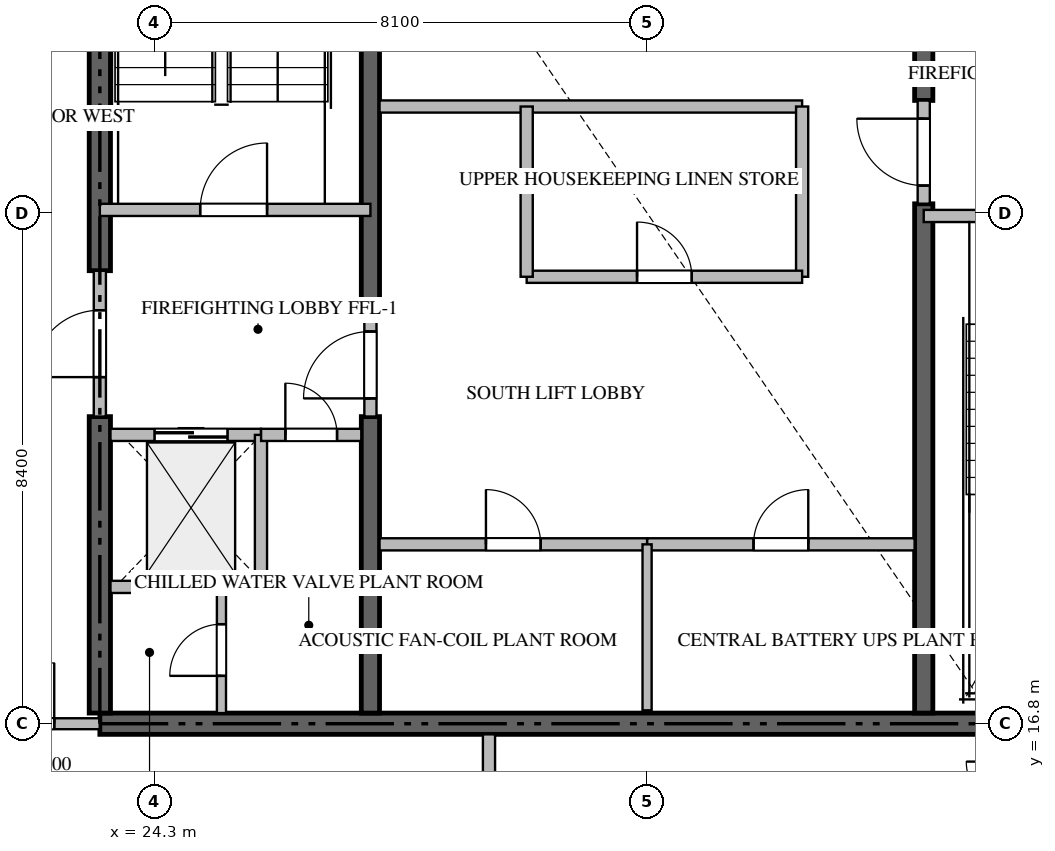
"""IFC4 building model, lengths in metres.
Left out: names, types, materials, properties, quantities, classifications, styles, units other than length and angle.
Written with IfcOpenShell. Run it as: python <this file> out.ifc"""

import sys

from ifc_helpers import new_model, si_unit, direction, frame, frame_2d, origin, place, context, subcontext, project, spatial, rectangle, extrude, source, transform, mapped, element, fill, save


model = new_model("IFC4")
c1 = context("Model", 3, precision=1e-05, world=origin(), true_north=direction((0.0, 1.0)))
c2 = subcontext(c1, "Body", "Model", "MODEL_VIEW")
j1 = project(units=[si_unit("LENGTHUNIT", "METRE"), si_unit("PLANEANGLEUNIT", "RADIAN")], contexts=[c1])
p1 = place(None, origin())
s1 = spatial("IfcSite", under=j1, at=p1, CompositionType="ELEMENT")
p2 = place(p1, origin())
s2 = spatial("IfcBuilding", under=s1, at=p2, CompositionType="ELEMENT")
p3 = place(p2, frame((0.0, 0.0, 297.5)))
s3 = spatial("IfcBuildingStorey", under=s2, at=p3, CompositionType="ELEMENT", Elevation=297.5)
p4 = place(p3, frame((23.4, 16.8, -0.26), z_axis=(0.0, 0.0, 1.0), x_axis=(1.0, 0.0, 0.0)))
e1 = element("IfcWall", 1, at=p4, inside=s3, PredefinedType="SHEAR", context=c2, shape_type="SweptSolid", body=[
    extrude(rectangle(XDim=18.0, YDim=0.35, at=frame_2d((9.0, 0.0))), origin(), (0.0, 0.0, 1.0), 4.048),
])
p5 = place(p3, frame((23.4, 16.975, -0.26), z_axis=(0.0, 0.0, 1.0), x_axis=(0.0, 1.0, 0.0)))
e2 = element("IfcWall", 2, at=p5, inside=s3, PredefinedType="SHEAR", context=c2, shape_type="SweptSolid", body=[
    extrude(rectangle(XDim=4.875, YDim=0.35, at=frame_2d((2.438, 0.0))), origin(), (0.0, 0.0, 1.0), 4.048),
])
p6 = place(p3, frame((23.4, 24.25, -0.26), z_axis=(0.0, 0.0, 1.0), x_axis=(0.0, 1.0, 0.0)))
e3 = element("IfcWall", 3, at=p6, inside=s3, PredefinedType="SHEAR", context=c2, shape_type="SweptSolid", body=[
    extrude(rectangle(XDim=9.175, YDim=0.35, at=frame_2d((4.587, 0.0))), origin(), (0.0, 0.0, 1.0), 4.048),
])
p7 = place(p3, frame((27.85, 16.975, -0.26), z_axis=(0.0, 0.0, 1.0), x_axis=(0.0, 1.0, 0.0)))
e4 = element("IfcWall", 4, at=p7, inside=s3, PredefinedType="SHEAR", context=c2, shape_type="SweptSolid", body=[
    extrude(rectangle(XDim=4.875, YDim=0.3, at=frame_2d((2.438, 0.0))), origin(), (0.0, 0.0, 1.0), 4.048),
])
p8 = place(p3, frame((27.85, 23.55, -0.26), z_axis=(0.0, 0.0, 1.0), x_axis=(0.0, 1.0, 0.0)))
e5 = element("IfcWall", 5, at=p8, inside=s3, PredefinedType="SHEAR", context=c2, shape_type="SweptSolid", body=[
    extrude(rectangle(XDim=9.875, YDim=0.3, at=frame_2d((4.938, 0.0))), origin(), (0.0, 0.0, 1.0), 4.048),
])
p9 = place(p3, frame((36.95, 16.975, -0.26), z_axis=(0.0, 0.0, 1.0), x_axis=(0.0, 1.0, 0.0)))
e6 = element("IfcWall", 6, at=p9, inside=s3, PredefinedType="SHEAR", context=c2, shape_type="SweptSolid", body=[
    extrude(rectangle(XDim=8.375, YDim=0.3, at=frame_2d((4.188, 0.0))), origin(), (0.0, 0.0, 1.0), 4.048),
])
p10 = place(p3, frame((36.95, 27.05, -0.26), z_axis=(0.0, 0.0, 1.0), x_axis=(0.0, 1.0, 0.0)))
e7 = element("IfcWall", 7, at=p10, inside=s3, PredefinedType="SHEAR", context=c2, shape_type="SweptSolid", body=[
    extrude(rectangle(XDim=6.375, YDim=0.3, at=frame_2d((3.188, 0.0))), origin(), (0.0, 0.0, 1.0), 4.048),
])
p11 = place(p3, frame((23.4, 25.25, 0.0), z_axis=(0.0, 0.0, 1.0), x_axis=(1.0, 0.0, 0.0)))
e8 = element("IfcWall", 8, at=p11, inside=s3, PredefinedType="STANDARD", context=c2, shape_type="SweptSolid", body=[
    extrude(rectangle(XDim=4.45, YDim=0.2, at=frame_2d((2.225, 0.0))), origin(), (0.0, 0.0, 1.0), 3.79),
])
p12 = place(p11, frame((1.65, 0.0, 0.0)))
e9 = element("IfcOpeningElement", 9, at=p12, cuts=e8, PredefinedType="OPENING", context=c2, shape_type="SweptSolid", body=[
    extrude(rectangle(XDim=1.1, YDim=2.15, at=frame_2d((0.55, 1.075))), frame((0.0, 0.11, 0.0), z_axis=(0.0, -1.0, 0.0), x_axis=(1.0, 0.0, 0.0)), (0.0, 0.0, 1.0), 0.22),
])
p13 = place(p3, frame((36.95, 25.15, 0.0), z_axis=(0.0, 0.0, 1.0), x_axis=(1.0, 0.0, 0.0)))
e10 = element("IfcWall", 10, at=p13, inside=s3, PredefinedType="STANDARD", context=c2, shape_type="SweptSolid", body=[
    extrude(rectangle(XDim=4.45, YDim=0.2, at=frame_2d((2.225, 0.0))), origin(), (0.0, 0.0, 1.0), 3.79),
])
p14 = place(p13, frame((1.65, 0.0, 0.0)))
e11 = element("IfcOpeningElement", 11, at=p14, cuts=e10, PredefinedType="OPENING", context=c2, shape_type="SweptSolid", body=[
    extrude(rectangle(XDim=1.1, YDim=2.15, at=frame_2d((0.55, 1.075))), frame((0.0, 0.11, 0.0), z_axis=(0.0, -1.0, 0.0), x_axis=(1.0, 0.0, 0.0)), (0.0, 0.0, 1.0), 0.22),
])
p15 = place(p3, frame((23.575, 21.55, 0.0), z_axis=(0.0, 0.0, 1.0), x_axis=(1.0, 0.0, 0.0)))
e12 = element("IfcWall", 12, at=p15, inside=s3, PredefinedType="STANDARD", context=c2, shape_type="SweptSolid", body=[
    extrude(rectangle(XDim=2.475, YDim=0.2, at=frame_2d((1.238, 0.0))), origin(), (0.0, 0.0, 1.0), 3.79),
])
p16 = place(p15, frame((0.725, 0.0, 0.0)))
e13 = element("IfcOpeningElement", 13, at=p16, cuts=e12, PredefinedType="OPENING", context=c2, shape_type="SweptSolid", body=[
    extrude(rectangle(XDim=1.2, YDim=2.2, at=frame_2d((0.6, 1.1))), frame((0.0, 0.11, 0.0), z_axis=(0.0, -1.0, 0.0), x_axis=(1.0, 0.0, 0.0)), (0.0, 0.0, 1.0), 0.22),
])
p17 = place(p3, frame((26.05, 19.05, 0.0), z_axis=(0.0, 0.0, 1.0), x_axis=(0.0, 1.0, 0.0)))
e14 = element("IfcWall", 14, at=p17, inside=s3, PredefinedType="STANDARD", context=c2, shape_type="SweptSolid", body=[
    extrude(rectangle(XDim=2.5, YDim=0.2, at=frame_2d((1.25, 0.0))), origin(), (0.0, 0.0, 1.0), 3.79),
])
p18 = place(p3, frame((23.575, 19.05, 0.0), z_axis=(0.0, 0.0, 1.0), x_axis=(1.0, 0.0, 0.0)))
e15 = element("IfcWall", 15, at=p18, inside=s3, PredefinedType="STANDARD", context=c2, shape_type="SweptSolid", body=[
    extrude(rectangle(XDim=2.475, YDim=0.2, at=frame_2d((1.238, 0.0))), origin(), (0.0, 0.0, 1.0), 3.79),
])
p19 = place(p3, frame((26.052, 21.55, 0.0), z_axis=(0.0, 0.0, 1.0), x_axis=(1.0, 0.0, 0.0)))
e16 = element("IfcWall", 16, at=p19, inside=s3, PredefinedType="STANDARD", context=c2, shape_type="SweptSolid", body=[
    extrude(rectangle(XDim=1.648, YDim=0.2, at=frame_2d((0.824, 0.0))), origin(), (0.0, 0.0, 1.0), 3.79),
])
p20 = place(p19, frame((0.399, 0.0, 0.0)))
e17 = element("IfcOpeningElement", 17, at=p20, cuts=e16, PredefinedType="OPENING", context=c2, shape_type="SweptSolid", body=[
    extrude(rectangle(XDim=0.85, YDim=2.1, at=frame_2d((0.425, 1.05))), frame((0.0, 0.11, 0.0), z_axis=(0.0, -1.0, 0.0), x_axis=(1.0, 0.0, 0.0)), (0.0, 0.0, 1.0), 0.22),
])
p21 = place(p3, frame((23.4, 21.852, 0.0), z_axis=(0.0, 0.0, 1.0), x_axis=(0.0, 1.0, 0.0)))
e18 = element("IfcWall", 18, at=p21, inside=s3, PredefinedType="STANDARD", context=c2, shape_type="SweptSolid", body=[
    extrude(rectangle(XDim=2.396, YDim=0.2, at=frame_2d((1.198, 0.0))), origin(), (0.0, 0.0, 1.0), 3.79),
])
p22 = place(p21, frame((0.648, 0.0, 0.0)))
e19 = element("IfcOpeningElement", 19, at=p22, cuts=e18, PredefinedType="OPENING", context=c2, shape_type="SweptSolid", body=[
    extrude(rectangle(XDim=1.1, YDim=2.15, at=frame_2d((0.55, 1.075))), frame((0.0, 0.11, 0.0), z_axis=(0.0, -1.0, 0.0), x_axis=(1.0, 0.0, 0.0)), (0.0, 0.0, 1.0), 0.22),
])
p23 = place(p3, frame((27.85, 21.852, 0.0), z_axis=(0.0, 0.0, 1.0), x_axis=(0.0, 1.0, 0.0)))
e20 = element("IfcWall", 20, at=p23, inside=s3, PredefinedType="STANDARD", context=c2, shape_type="SweptSolid", body=[
    extrude(rectangle(XDim=1.696, YDim=0.2, at=frame_2d((0.848, 0.0))), origin(), (0.0, 0.0, 1.0), 3.79),
])
p24 = place(p23, frame((0.298, 0.0, 0.0)))
e21 = element("IfcOpeningElement", 21, at=p24, cuts=e20, PredefinedType="OPENING", context=c2, shape_type="SweptSolid", body=[
    extrude(rectangle(XDim=1.1, YDim=2.15, at=frame_2d((0.55, 1.075))), frame((0.0, 0.11, 0.0), z_axis=(0.0, -1.0, 0.0), x_axis=(1.0, 0.0, 0.0)), (0.0, 0.0, 1.0), 0.22),
])
p25 = place(p3, frame((36.95, 25.352, 0.0), z_axis=(0.0, 0.0, 1.0), x_axis=(0.0, 1.0, 0.0)))
e22 = element("IfcWall", 22, at=p25, inside=s3, PredefinedType="STANDARD", context=c2, shape_type="SweptSolid", body=[
    extrude(rectangle(XDim=1.696, YDim=0.2, at=frame_2d((0.848, 0.0))), origin(), (0.0, 0.0, 1.0), 3.79),
])
p26 = place(p25, frame((0.298, 0.0, 0.0)))
e23 = element("IfcOpeningElement", 23, at=p26, cuts=e22, PredefinedType="OPENING", context=c2, shape_type="SweptSolid", body=[
    extrude(rectangle(XDim=1.1, YDim=2.15, at=frame_2d((0.55, 1.075))), frame((0.0, 0.11, 0.0), z_axis=(0.0, -1.0, 0.0), x_axis=(1.0, 0.0, 0.0)), (0.0, 0.0, 1.0), 0.22),
])
p27 = place(p3, frame((25.4, 16.975, 0.0), z_axis=(0.0, 0.0, 1.0), x_axis=(0.0, 1.0, 0.0)))
e24 = element("IfcWall", 24, at=p27, inside=s3, PredefinedType="PARTITIONING", context=c2, shape_type="SweptSolid", body=[
    extrude(rectangle(XDim=2.075, YDim=0.15, at=frame_2d((1.038, 0.0))), origin(), (0.0, 0.0, 1.0), 3.79),
])
p28 = place(p27, frame((0.612, 0.0, 0.0)))
e25 = element("IfcOpeningElement", 25, at=p28, cuts=e24, PredefinedType="OPENING", context=c2, shape_type="SweptSolid", body=[
    extrude(rectangle(XDim=0.85, YDim=2.1, at=frame_2d((0.425, 1.05))), frame((0.0, 0.085, 0.0), z_axis=(0.0, -1.0, 0.0), x_axis=(1.0, 0.0, 0.0)), (0.0, 0.0, 1.0), 0.17),
])
p29 = place(p3, frame((28.0, 19.75, 0.0), z_axis=(0.0, 0.0, 1.0), x_axis=(1.0, 0.0, 0.0)))
e26 = element("IfcWall", 26, at=p29, inside=s3, PredefinedType="STANDARD", context=c2, shape_type="SweptSolid", body=[
    extrude(rectangle(XDim=4.4, YDim=0.2, at=frame_2d((2.2, 0.0))), origin(), (0.0, 0.0, 1.0), 3.79),
])
p30 = place(p29, frame((1.75, 0.0, 0.0)))
e27 = element("IfcOpeningElement", 27, at=p30, cuts=e26, PredefinedType="OPENING", context=c2, shape_type="SweptSolid", body=[
    extrude(rectangle(XDim=0.9, YDim=2.1, at=frame_2d((0.45, 1.05))), frame((0.0, 0.11, 0.0), z_axis=(0.0, -1.0, 0.0), x_axis=(1.0, 0.0, 0.0)), (0.0, 0.0, 1.0), 0.22),
])
p31 = place(p3, frame((32.402, 19.75, 0.0), z_axis=(0.0, 0.0, 1.0), x_axis=(1.0, 0.0, 0.0)))
e28 = element("IfcWall", 28, at=p31, inside=s3, PredefinedType="STANDARD", context=c2, shape_type="SweptSolid", body=[
    extrude(rectangle(XDim=4.398, YDim=0.2, at=frame_2d((2.199, 0.0))), origin(), (0.0, 0.0, 1.0), 3.79),
])
p32 = place(p31, frame((1.749, 0.0, 0.0)))
e29 = element("IfcOpeningElement", 29, at=p32, cuts=e28, PredefinedType="OPENING", context=c2, shape_type="SweptSolid", body=[
    extrude(rectangle(XDim=0.9, YDim=2.1, at=frame_2d((0.45, 1.05))), frame((0.0, 0.11, 0.0), z_axis=(0.0, -1.0, 0.0), x_axis=(1.0, 0.0, 0.0)), (0.0, 0.0, 1.0), 0.22),
])
p33 = place(p3, frame((32.4, 17.02, 0.0), z_axis=(0.0, 0.0, 1.0), x_axis=(0.0, 1.0, 0.0)))
e30 = element("IfcWall", 30, at=p33, inside=s3, PredefinedType="PARTITIONING", context=c2, shape_type="SweptSolid", body=[
    extrude(rectangle(XDim=2.73, YDim=0.15, at=frame_2d((1.365, 0.0))), origin(), (0.0, 0.0, 1.0), 3.79),
])
p34 = place(p3, frame((28.0, 26.95, 0.0), z_axis=(0.0, 0.0, 1.0), x_axis=(1.0, 0.0, 0.0)))
e31 = element("IfcWall", 31, at=p34, inside=s3, PredefinedType="STANDARD", context=c2, shape_type="SweptSolid", body=[
    extrude(rectangle(XDim=6.95, YDim=0.2, at=frame_2d((3.475, 0.0))), origin(), (0.0, 0.0, 1.0), 3.79),
])
p35 = place(p3, frame((34.95, 24.15, 0.0), z_axis=(0.0, 0.0, 1.0), x_axis=(0.0, 1.0, 0.0)))
e32 = element("IfcWall", 32, at=p35, inside=s3, PredefinedType="STANDARD", context=c2, shape_type="SweptSolid", body=[
    extrude(rectangle(XDim=2.8, YDim=0.2, at=frame_2d((1.4, 0.0))), origin(), (0.0, 0.0, 1.0), 3.79),
])
p36 = place(p3, frame((30.42, 24.15, 0.0), z_axis=(0.0, 0.0, 1.0), x_axis=(1.0, 0.0, 0.0)))
e33 = element("IfcWall", 33, at=p36, inside=s3, PredefinedType="STANDARD", context=c2, shape_type="SweptSolid", body=[
    extrude(rectangle(XDim=4.53, YDim=0.2, at=frame_2d((2.265, 0.0))), origin(), (0.0, 0.0, 1.0), 3.79),
])
p37 = place(p36, frame((1.815, 0.0, 0.0)))
e34 = element("IfcOpeningElement", 34, at=p37, cuts=e33, PredefinedType="OPENING", context=c2, shape_type="SweptSolid", body=[
    extrude(rectangle(XDim=0.9, YDim=2.1, at=frame_2d((0.45, 1.05))), frame((0.0, 0.11, 0.0), z_axis=(0.0, -1.0, 0.0), x_axis=(1.0, 0.0, 0.0)), (0.0, 0.0, 1.0), 0.22),
])
p38 = place(p3, frame((30.42, 24.15, 0.0), z_axis=(0.0, 0.0, 1.0), x_axis=(0.0, 1.0, 0.0)))
e35 = element("IfcWall", 35, at=p38, inside=s3, PredefinedType="STANDARD", context=c2, shape_type="SweptSolid", body=[
    extrude(rectangle(XDim=2.8, YDim=0.2, at=frame_2d((1.4, 0.0))), origin(), (0.0, 0.0, 1.0), 3.79),
])
p39 = place(p3, frame((29.8, 2.482, 0.0), z_axis=(0.0, 0.0, 1.0), x_axis=(0.0, 1.0, 0.0)))
e36 = element("IfcWall", 36, at=p39, inside=s3, PredefinedType="PARTITIONING", context=c2, shape_type="SweptSolid", body=[
    extrude(rectangle(XDim=14.143, YDim=0.2, at=frame_2d((7.072, 0.0))), origin(), (0.0, 0.0, 1.0), 3.79),
])
p40 = place(p3, frame((20.902, 16.8, 0.0), z_axis=(0.0, 0.0, 1.0), x_axis=(1.0, 0.0, 0.0)))
e37 = element("IfcWall", 37, at=p40, inside=s3, PredefinedType="PARTITIONING", context=c2, shape_type="SweptSolid", body=[
    extrude(rectangle(XDim=2.496, YDim=0.18, at=frame_2d((1.248, 0.0))), origin(), (0.0, 0.0, 1.0), 3.79),
])
p41 = place(p40, frame((0.748, 0.0, 0.0)))
e38 = element("IfcOpeningElement", 38, at=p41, cuts=e37, PredefinedType="OPENING", context=c2, shape_type="SweptSolid", body=[
    extrude(rectangle(XDim=1.0, YDim=2.15, at=frame_2d((0.5, 1.075))), frame((0.0, 0.1, 0.0), z_axis=(0.0, -1.0, 0.0), x_axis=(1.0, 0.0, 0.0)), (0.0, 0.0, 1.0), 0.2),
])
m1 = source(origin(), c2, "Body", "SweptSolid", [
    extrude(rectangle(XDim=1.1, YDim=2.15, at=frame_2d((0.55, 1.075))), frame((0.0, 0.025, 0.0), z_axis=(0.0, -1.0, 0.0), x_axis=(1.0, 0.0, 0.0)), (0.0, 0.0, 1.0), 0.05),
])
p42 = place(p12, origin())
e39 = element("IfcDoor", 39, at=p42, inside=s3, OperationType="SINGLE_SWING_RIGHT", PredefinedType="DOOR", context=c2, shape_type="MappedRepresentation", body=[
    mapped(m1, transform((0.0, 0.0, 0.0), scale=1.0)),
])
fill(e9, e39)
m2 = source(origin(), c2, "Body", "SweptSolid", [
    extrude(rectangle(XDim=1.2, YDim=2.2, at=frame_2d((0.6, 1.1))), frame((0.0, 0.025, 0.0), z_axis=(0.0, -1.0, 0.0), x_axis=(1.0, 0.0, 0.0)), (0.0, 0.0, 1.0), 0.05),
])
p43 = place(p16, origin())
e40 = element("IfcDoor", 40, at=p43, inside=s3, OperationType="DOUBLE_DOOR_SLIDING", PredefinedType="DOOR", context=c2, shape_type="MappedRepresentation", body=[
    mapped(m2, transform((0.0, 0.0, 0.0), scale=1.0)),
])
fill(e13, e40)
m3 = source(origin(), c2, "Body", "SweptSolid", [
    extrude(rectangle(XDim=0.85, YDim=2.1, at=frame_2d((0.425, 1.05))), frame((0.0, 0.025, 0.0), z_axis=(0.0, -1.0, 0.0), x_axis=(1.0, 0.0, 0.0)), (0.0, 0.0, 1.0), 0.05),
])
p44 = place(p20, origin())
e41 = element("IfcDoor", 41, at=p44, inside=s3, OperationType="SINGLE_SWING_LEFT", PredefinedType="DOOR", context=c2, shape_type="MappedRepresentation", body=[
    mapped(m3, transform((0.0, 0.0, 0.0), scale=1.0)),
])
fill(e17, e41)
p45 = place(p22, origin())
e42 = element("IfcDoor", 42, at=p45, inside=s3, OperationType="SINGLE_SWING_LEFT", PredefinedType="DOOR", context=c2, shape_type="MappedRepresentation", body=[
    mapped(m1, transform((0.0, 0.0, 0.0), scale=1.0)),
])
fill(e19, e42)
p46 = place(p24, origin())
e43 = element("IfcDoor", 43, at=p46, inside=s3, OperationType="SINGLE_SWING_LEFT", PredefinedType="DOOR", context=c2, shape_type="MappedRepresentation", body=[
    mapped(m1, transform((0.0, 0.0, 0.0), scale=1.0)),
])
fill(e21, e43)
p47 = place(p26, origin())
e44 = element("IfcDoor", 44, at=p47, inside=s3, OperationType="SINGLE_SWING_RIGHT", PredefinedType="DOOR", context=c2, shape_type="MappedRepresentation", body=[
    mapped(m1, transform((0.0, 0.0, 0.0), scale=1.0)),
])
fill(e23, e44)
p48 = place(p28, origin())
e45 = element("IfcDoor", 45, at=p48, inside=s3, OperationType="SINGLE_SWING_LEFT", PredefinedType="DOOR", context=c2, shape_type="MappedRepresentation", body=[
    mapped(m3, transform((0.0, 0.0, 0.0), scale=1.0)),
])
fill(e25, e45)
m4 = source(origin(), c2, "Body", "SweptSolid", [
    extrude(rectangle(XDim=0.9, YDim=2.1, at=frame_2d((0.45, 1.05))), frame((0.0, 0.025, 0.0), z_axis=(0.0, -1.0, 0.0), x_axis=(1.0, 0.0, 0.0)), (0.0, 0.0, 1.0), 0.05),
])
p49 = place(p30, origin())
e46 = element("IfcDoor", 46, at=p49, inside=s3, OperationType="SINGLE_SWING_LEFT", PredefinedType="DOOR", context=c2, shape_type="MappedRepresentation", body=[
    mapped(m4, transform((0.0, 0.0, 0.0), scale=1.0)),
])
fill(e27, e46)
p50 = place(p32, origin())
e47 = element("IfcDoor", 47, at=p50, inside=s3, OperationType="SINGLE_SWING_RIGHT", PredefinedType="DOOR", context=c2, shape_type="MappedRepresentation", body=[
    mapped(m4, transform((0.0, 0.0, 0.0), scale=1.0)),
])
fill(e29, e47)
p51 = place(p37, origin())
e48 = element("IfcDoor", 48, at=p51, inside=s3, OperationType="SINGLE_SWING_LEFT", PredefinedType="DOOR", context=c2, shape_type="MappedRepresentation", body=[
    mapped(m4, transform((0.0, 0.0, 0.0), scale=1.0)),
])
fill(e34, e48)
m5 = source(origin(), c2, "Body", "SweptSolid", [
    extrude(rectangle(XDim=1.0, YDim=2.15, at=frame_2d((0.5, 1.075))), frame((0.0, 0.025, 0.0), z_axis=(0.0, -1.0, 0.0), x_axis=(1.0, 0.0, 0.0)), (0.0, 0.0, 1.0), 0.05),
])
p52 = place(p41, origin())
e49 = element("IfcDoor", 49, at=p52, inside=s3, OperationType="SINGLE_SWING_RIGHT", PredefinedType="DOOR", context=c2, shape_type="MappedRepresentation", body=[
    mapped(m5, transform((0.0, 0.0, 0.0), scale=1.0)),
])
fill(e38, e49)
save(model, sys.argv[1])
